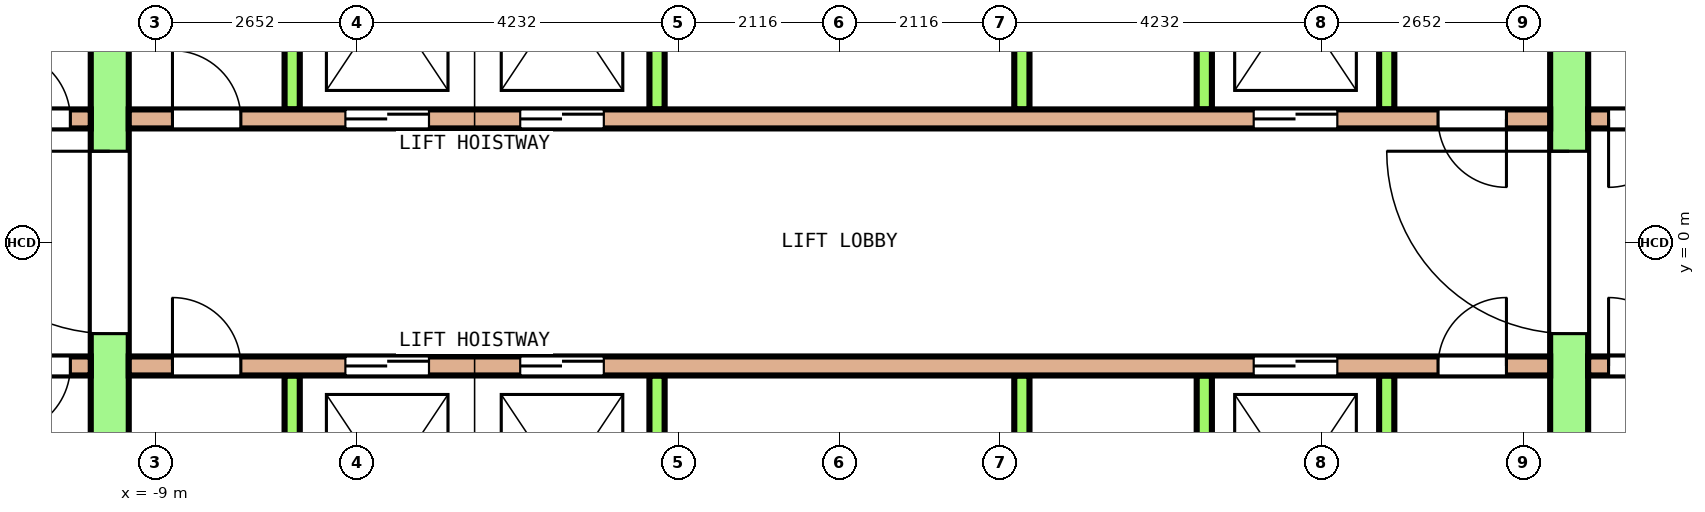
"""IFC4 building model, lengths in metres.
Left out: names, types, materials, properties, quantities, classifications, styles, units other than length and angle.
Written with IfcOpenShell. Run it as: python <this file> out.ifc"""

import sys

from ifc_helpers import new_model, si_unit, direction, frame, frame_2d, origin, place, context, subcontext, project, spatial, rectangle, extrude, element, fill, save


model = new_model("IFC4")
c1 = context("Model", 3, precision=1e-05, world=origin(), true_north=direction((0.0, 1.0)))
c2 = subcontext(c1, "Body", "Model", "MODEL_VIEW")
j1 = project(units=[si_unit("LENGTHUNIT", "METRE"), si_unit("PLANEANGLEUNIT", "RADIAN")], contexts=[c1])
p1 = place(None, origin())
s1 = spatial("IfcSite", under=j1, at=p1, CompositionType="ELEMENT")
p2 = place(p1, origin())
s2 = spatial("IfcBuilding", under=s1, at=p2, CompositionType="ELEMENT")
p3 = place(p2, frame((0.0, 0.0, 198.0)))
s3 = spatial("IfcBuildingStorey", under=s2, at=p3, CompositionType="ELEMENT", Elevation=198.0)
p4 = place(p3, frame((-9.6, -7.75, 0.0), z_axis=(0.0, 0.0, 1.0), x_axis=(0.0, 1.0, 0.0)))
e1 = element("IfcWall", 1, at=p4, inside=s3, PredefinedType="SHEAR", context=c2, shape_type="SweptSolid", body=[
    extrude(rectangle(XDim=15.5, YDim=0.5, at=frame_2d((7.75, 0.0))), origin(), (0.0, 0.0, 1.0), 4.1),
])
p5 = place(p4, frame((6.55, 0.0, 0.0)))
e2 = element("IfcOpeningElement", 2, at=p5, cuts=e1, PredefinedType="OPENING", context=c2, shape_type="SweptSolid", body=[
    extrude(rectangle(XDim=2.4, YDim=2.1, at=frame_2d((1.2, 1.05))), frame((0.0, 0.26, 0.0), z_axis=(0.0, -1.0, 0.0), x_axis=(1.0, 0.0, 0.0)), (0.0, 0.0, 1.0), 0.52),
])
p6 = place(p4, frame((13.45, 0.0, 0.0)))
e3 = element("IfcOpeningElement", 3, at=p6, cuts=e1, PredefinedType="OPENING", context=c2, shape_type="SweptSolid", body=[
    extrude(rectangle(XDim=1.2, YDim=2.1, at=frame_2d((0.6, 1.05))), frame((0.0, 0.26, 0.0), z_axis=(0.0, -1.0, 0.0), x_axis=(1.0, 0.0, 0.0)), (0.0, 0.0, 1.0), 0.52),
])
p7 = place(p4, frame((0.85, 0.0, 0.0)))
e4 = element("IfcOpeningElement", 4, at=p7, cuts=e1, PredefinedType="OPENING", context=c2, shape_type="SweptSolid", body=[
    extrude(rectangle(XDim=1.2, YDim=2.1, at=frame_2d((0.6, 1.05))), frame((0.0, 0.26, 0.0), z_axis=(0.0, -1.0, 0.0), x_axis=(1.0, 0.0, 0.0)), (0.0, 0.0, 1.0), 0.52),
])
p8 = place(p3, frame((9.6, -7.75, 0.0), z_axis=(0.0, 0.0, 1.0), x_axis=(0.0, 1.0, 0.0)))
e5 = element("IfcWall", 5, at=p8, inside=s3, PredefinedType="SHEAR", context=c2, shape_type="SweptSolid", body=[
    extrude(rectangle(XDim=15.5, YDim=0.5, at=frame_2d((7.75, 0.0))), origin(), (0.0, 0.0, 1.0), 4.1),
])
p9 = place(p8, frame((6.55, 0.0, 0.0)))
e6 = element("IfcOpeningElement", 6, at=p9, cuts=e5, PredefinedType="OPENING", context=c2, shape_type="SweptSolid", body=[
    extrude(rectangle(XDim=2.4, YDim=2.1, at=frame_2d((1.2, 1.05))), frame((0.0, 0.26, 0.0), z_axis=(0.0, -1.0, 0.0), x_axis=(1.0, 0.0, 0.0)), (0.0, 0.0, 1.0), 0.52),
])
p10 = place(p8, frame((13.45, 0.0, 0.0)))
e7 = element("IfcOpeningElement", 7, at=p10, cuts=e5, PredefinedType="OPENING", context=c2, shape_type="SweptSolid", body=[
    extrude(rectangle(XDim=1.2, YDim=2.1, at=frame_2d((0.6, 1.05))), frame((0.0, 0.26, 0.0), z_axis=(0.0, -1.0, 0.0), x_axis=(1.0, 0.0, 0.0)), (0.0, 0.0, 1.0), 0.52),
])
p11 = place(p8, frame((0.95, 0.0, 0.0)))
e8 = element("IfcOpeningElement", 8, at=p11, cuts=e5, PredefinedType="OPENING", context=c2, shape_type="SweptSolid", body=[
    extrude(rectangle(XDim=1.0, YDim=2.1, at=frame_2d((0.5, 1.05))), frame((0.0, 0.26, 0.0), z_axis=(0.0, -1.0, 0.0), x_axis=(1.0, 0.0, 0.0)), (0.0, 0.0, 1.0), 0.52),
])
p12 = place(p3, frame((-12.85, 1.625, 0.0), z_axis=(0.0, 0.0, 1.0), x_axis=(1.0, 0.0, 0.0)))
e9 = element("IfcWall", 9, at=p12, inside=s3, PredefinedType="SOLIDWALL", context=c2, shape_type="SweptSolid", body=[
    extrude(rectangle(XDim=3.0, YDim=0.25, at=frame_2d((1.5, 0.0))), origin(), (0.0, 0.0, 1.0), 4.1),
])
p13 = place(p12, frame((0.269, 0.0, 0.0)))
e10 = element("IfcOpeningElement", 10, at=p13, cuts=e9, PredefinedType="OPENING", context=c2, shape_type="SweptSolid", body=[
    extrude(rectangle(XDim=0.9, YDim=2.1, at=frame_2d((0.45, 1.05))), frame((0.0, 0.135, 0.0), z_axis=(0.0, -1.0, 0.0), x_axis=(1.0, 0.0, 0.0)), (0.0, 0.0, 1.0), 0.27),
])
p14 = place(p12, frame((1.831, 0.0, 0.0)))
e11 = element("IfcOpeningElement", 11, at=p14, cuts=e9, PredefinedType="OPENING", context=c2, shape_type="SweptSolid", body=[
    extrude(rectangle(XDim=0.9, YDim=2.1, at=frame_2d((0.45, 1.05))), frame((0.0, 0.135, 0.0), z_axis=(0.0, -1.0, 0.0), x_axis=(1.0, 0.0, 0.0)), (0.0, 0.0, 1.0), 0.27),
])
p15 = place(p3, frame((-9.35, 1.625, 0.0), z_axis=(0.0, 0.0, 1.0), x_axis=(1.0, 0.0, 0.0)))
e12 = element("IfcWall", 12, at=p15, inside=s3, PredefinedType="SOLIDWALL", context=c2, shape_type="SweptSolid", body=[
    extrude(rectangle(XDim=18.7, YDim=0.25, at=frame_2d((9.35, 0.0))), origin(), (0.0, 0.0, 1.0), 4.1),
])
p16 = place(p15, frame((2.85, 0.0, 0.0)))
e13 = element("IfcOpeningElement", 13, at=p16, cuts=e12, PredefinedType="OPENING", context=c2, shape_type="SweptSolid", body=[
    extrude(rectangle(XDim=1.1, YDim=2.1, at=frame_2d((0.55, 1.05))), frame((0.0, 0.135, 0.0), z_axis=(0.0, -1.0, 0.0), x_axis=(1.0, 0.0, 0.0)), (0.0, 0.0, 1.0), 0.27),
])
p17 = place(p15, frame((5.15, 0.0, 0.0)))
e14 = element("IfcOpeningElement", 14, at=p17, cuts=e12, PredefinedType="OPENING", context=c2, shape_type="SweptSolid", body=[
    extrude(rectangle(XDim=1.1, YDim=2.1, at=frame_2d((0.55, 1.05))), frame((0.0, 0.135, 0.0), z_axis=(0.0, -1.0, 0.0), x_axis=(1.0, 0.0, 0.0)), (0.0, 0.0, 1.0), 0.27),
])
p18 = place(p15, frame((14.8, 0.0, 0.0)))
e15 = element("IfcOpeningElement", 15, at=p18, cuts=e12, PredefinedType="OPENING", context=c2, shape_type="SweptSolid", body=[
    extrude(rectangle(XDim=1.1, YDim=2.1, at=frame_2d((0.55, 1.05))), frame((0.0, 0.135, 0.0), z_axis=(0.0, -1.0, 0.0), x_axis=(1.0, 0.0, 0.0)), (0.0, 0.0, 1.0), 0.27),
])
p19 = place(p15, frame((0.575, 0.0, 0.0)))
e16 = element("IfcOpeningElement", 16, at=p19, cuts=e12, PredefinedType="OPENING", context=c2, shape_type="SweptSolid", body=[
    extrude(rectangle(XDim=0.9, YDim=2.1, at=frame_2d((0.45, 1.05))), frame((0.0, 0.135, 0.0), z_axis=(0.0, -1.0, 0.0), x_axis=(1.0, 0.0, 0.0)), (0.0, 0.0, 1.0), 0.27),
])
p20 = place(p15, frame((17.225, 0.0, 0.0)))
e17 = element("IfcOpeningElement", 17, at=p20, cuts=e12, PredefinedType="OPENING", context=c2, shape_type="SweptSolid", body=[
    extrude(rectangle(XDim=0.9, YDim=2.1, at=frame_2d((0.45, 1.05))), frame((0.0, 0.135, 0.0), z_axis=(0.0, -1.0, 0.0), x_axis=(1.0, 0.0, 0.0)), (0.0, 0.0, 1.0), 0.27),
])
p21 = place(p3, frame((9.85, 1.625, 0.0), z_axis=(0.0, 0.0, 1.0), x_axis=(1.0, 0.0, 0.0)))
e18 = element("IfcWall", 18, at=p21, inside=s3, PredefinedType="SOLIDWALL", context=c2, shape_type="SweptSolid", body=[
    extrude(rectangle(XDim=3.0, YDim=0.25, at=frame_2d((1.5, 0.0))), origin(), (0.0, 0.0, 1.0), 4.1),
])
p22 = place(p21, frame((0.269, 0.0, 0.0)))
e19 = element("IfcOpeningElement", 19, at=p22, cuts=e18, PredefinedType="OPENING", context=c2, shape_type="SweptSolid", body=[
    extrude(rectangle(XDim=0.9, YDim=2.1, at=frame_2d((0.45, 1.05))), frame((0.0, 0.135, 0.0), z_axis=(0.0, -1.0, 0.0), x_axis=(1.0, 0.0, 0.0)), (0.0, 0.0, 1.0), 0.27),
])
p23 = place(p21, frame((1.831, 0.0, 0.0)))
e20 = element("IfcOpeningElement", 20, at=p23, cuts=e18, PredefinedType="OPENING", context=c2, shape_type="SweptSolid", body=[
    extrude(rectangle(XDim=0.9, YDim=2.1, at=frame_2d((0.45, 1.05))), frame((0.0, 0.135, 0.0), z_axis=(0.0, -1.0, 0.0), x_axis=(1.0, 0.0, 0.0)), (0.0, 0.0, 1.0), 0.27),
])
for number, where, z_axis, x_axis in (
    (21, (-7.2, 1.75, 0.0), (0.0, 0.0, 1.0), (0.0, 1.0, 0.0)),
    (22, (-2.4, 1.75, 0.0), (0.0, 0.0, 1.0), (0.0, 1.0, 0.0)),
    (23, (2.4, 1.75, 0.0), (0.0, 0.0, 1.0), (0.0, 1.0, 0.0)),
    (24, (4.8, 1.75, 0.0), (0.0, 0.0, 1.0), (0.0, 1.0, 0.0)),
    (25, (7.2, 1.75, 0.0), (0.0, 0.0, 1.0), (0.0, 1.0, 0.0)),
):
    element("IfcWall", number, at=place(p3, frame(where, z_axis=z_axis, x_axis=x_axis)), inside=s3, PredefinedType="SOLIDWALL", context=c2, shape_type="SweptSolid", body=[
        extrude(rectangle(XDim=2.9, YDim=0.2, at=frame_2d((1.45, 0.0))), origin(), (0.0, 0.0, 1.0), 4.1),
    ])
p24 = place(p3, frame((-12.85, -1.625, 0.0), z_axis=(0.0, 0.0, 1.0), x_axis=(1.0, 0.0, 0.0)))
e26 = element("IfcWall", 26, at=p24, inside=s3, PredefinedType="SOLIDWALL", context=c2, shape_type="SweptSolid", body=[
    extrude(rectangle(XDim=3.0, YDim=0.25, at=frame_2d((1.5, 0.0))), origin(), (0.0, 0.0, 1.0), 4.1),
])
p25 = place(p24, frame((0.269, 0.0, 0.0)))
e27 = element("IfcOpeningElement", 27, at=p25, cuts=e26, PredefinedType="OPENING", context=c2, shape_type="SweptSolid", body=[
    extrude(rectangle(XDim=0.9, YDim=2.1, at=frame_2d((0.45, 1.05))), frame((0.0, 0.135, 0.0), z_axis=(0.0, -1.0, 0.0), x_axis=(1.0, 0.0, 0.0)), (0.0, 0.0, 1.0), 0.27),
])
p26 = place(p24, frame((1.831, 0.0, 0.0)))
e28 = element("IfcOpeningElement", 28, at=p26, cuts=e26, PredefinedType="OPENING", context=c2, shape_type="SweptSolid", body=[
    extrude(rectangle(XDim=0.9, YDim=2.1, at=frame_2d((0.45, 1.05))), frame((0.0, 0.135, 0.0), z_axis=(0.0, -1.0, 0.0), x_axis=(1.0, 0.0, 0.0)), (0.0, 0.0, 1.0), 0.27),
])
p27 = place(p3, frame((-9.35, -1.625, 0.0), z_axis=(0.0, 0.0, 1.0), x_axis=(1.0, 0.0, 0.0)))
e29 = element("IfcWall", 29, at=p27, inside=s3, PredefinedType="SOLIDWALL", context=c2, shape_type="SweptSolid", body=[
    extrude(rectangle(XDim=18.7, YDim=0.25, at=frame_2d((9.35, 0.0))), origin(), (0.0, 0.0, 1.0), 4.1),
])
p28 = place(p27, frame((2.85, 0.0, 0.0)))
e30 = element("IfcOpeningElement", 30, at=p28, cuts=e29, PredefinedType="OPENING", context=c2, shape_type="SweptSolid", body=[
    extrude(rectangle(XDim=1.1, YDim=2.1, at=frame_2d((0.55, 1.05))), frame((0.0, 0.135, 0.0), z_axis=(0.0, -1.0, 0.0), x_axis=(1.0, 0.0, 0.0)), (0.0, 0.0, 1.0), 0.27),
])
p29 = place(p27, frame((5.15, 0.0, 0.0)))
e31 = element("IfcOpeningElement", 31, at=p29, cuts=e29, PredefinedType="OPENING", context=c2, shape_type="SweptSolid", body=[
    extrude(rectangle(XDim=1.1, YDim=2.1, at=frame_2d((0.55, 1.05))), frame((0.0, 0.135, 0.0), z_axis=(0.0, -1.0, 0.0), x_axis=(1.0, 0.0, 0.0)), (0.0, 0.0, 1.0), 0.27),
])
p30 = place(p27, frame((14.8, 0.0, 0.0)))
e32 = element("IfcOpeningElement", 32, at=p30, cuts=e29, PredefinedType="OPENING", context=c2, shape_type="SweptSolid", body=[
    extrude(rectangle(XDim=1.1, YDim=2.1, at=frame_2d((0.55, 1.05))), frame((0.0, 0.135, 0.0), z_axis=(0.0, -1.0, 0.0), x_axis=(1.0, 0.0, 0.0)), (0.0, 0.0, 1.0), 0.27),
])
p31 = place(p27, frame((0.575, 0.0, 0.0)))
e33 = element("IfcOpeningElement", 33, at=p31, cuts=e29, PredefinedType="OPENING", context=c2, shape_type="SweptSolid", body=[
    extrude(rectangle(XDim=0.9, YDim=2.1, at=frame_2d((0.45, 1.05))), frame((0.0, 0.135, 0.0), z_axis=(0.0, -1.0, 0.0), x_axis=(1.0, 0.0, 0.0)), (0.0, 0.0, 1.0), 0.27),
])
p32 = place(p27, frame((17.225, 0.0, 0.0)))
e34 = element("IfcOpeningElement", 34, at=p32, cuts=e29, PredefinedType="OPENING", context=c2, shape_type="SweptSolid", body=[
    extrude(rectangle(XDim=0.9, YDim=2.1, at=frame_2d((0.45, 1.05))), frame((0.0, 0.135, 0.0), z_axis=(0.0, -1.0, 0.0), x_axis=(1.0, 0.0, 0.0)), (0.0, 0.0, 1.0), 0.27),
])
p33 = place(p3, frame((9.85, -1.625, 0.0), z_axis=(0.0, 0.0, 1.0), x_axis=(1.0, 0.0, 0.0)))
e35 = element("IfcWall", 35, at=p33, inside=s3, PredefinedType="SOLIDWALL", context=c2, shape_type="SweptSolid", body=[
    extrude(rectangle(XDim=3.0, YDim=0.25, at=frame_2d((1.5, 0.0))), origin(), (0.0, 0.0, 1.0), 4.1),
])
p34 = place(p33, frame((0.269, 0.0, 0.0)))
e36 = element("IfcOpeningElement", 36, at=p34, cuts=e35, PredefinedType="OPENING", context=c2, shape_type="SweptSolid", body=[
    extrude(rectangle(XDim=0.9, YDim=2.1, at=frame_2d((0.45, 1.05))), frame((0.0, 0.135, 0.0), z_axis=(0.0, -1.0, 0.0), x_axis=(1.0, 0.0, 0.0)), (0.0, 0.0, 1.0), 0.27),
])
p35 = place(p33, frame((1.831, 0.0, 0.0)))
e37 = element("IfcOpeningElement", 37, at=p35, cuts=e35, PredefinedType="OPENING", context=c2, shape_type="SweptSolid", body=[
    extrude(rectangle(XDim=0.9, YDim=2.1, at=frame_2d((0.45, 1.05))), frame((0.0, 0.135, 0.0), z_axis=(0.0, -1.0, 0.0), x_axis=(1.0, 0.0, 0.0)), (0.0, 0.0, 1.0), 0.27),
])
for number, where, z_axis, x_axis in (
    (38, (-7.2, -4.65, 0.0), (0.0, 0.0, 1.0), (0.0, 1.0, 0.0)),
    (39, (-2.4, -4.65, 0.0), (0.0, 0.0, 1.0), (0.0, 1.0, 0.0)),
    (40, (2.4, -4.65, 0.0), (0.0, 0.0, 1.0), (0.0, 1.0, 0.0)),
    (41, (4.8, -4.65, 0.0), (0.0, 0.0, 1.0), (0.0, 1.0, 0.0)),
    (42, (7.2, -4.65, 0.0), (0.0, 0.0, 1.0), (0.0, 1.0, 0.0)),
):
    element("IfcWall", number, at=place(p3, frame(where, z_axis=z_axis, x_axis=x_axis)), inside=s3, PredefinedType="SOLIDWALL", context=c2, shape_type="SweptSolid", body=[
        extrude(rectangle(XDim=2.9, YDim=0.2, at=frame_2d((1.45, 0.0))), origin(), (0.0, 0.0, 1.0), 4.1),
    ])
p36 = place(p16, origin())
e43 = element("IfcDoor", 43, at=p36, inside=s3, OperationType="DOUBLE_DOOR_SLIDING", PredefinedType="DOOR", context=c2, shape_type="SweptSolid", body=[
    extrude(rectangle(XDim=1.1, YDim=2.1, at=frame_2d((0.55, 1.05))), frame((0.0, 0.075, 0.0), z_axis=(0.0, -1.0, 0.0), x_axis=(1.0, 0.0, 0.0)), (0.0, 0.0, 1.0), 0.15),
])
fill(e13, e43)
p37 = place(p17, origin())
e44 = element("IfcDoor", 44, at=p37, inside=s3, OperationType="DOUBLE_DOOR_SLIDING", PredefinedType="DOOR", context=c2, shape_type="SweptSolid", body=[
    extrude(rectangle(XDim=1.1, YDim=2.1, at=frame_2d((0.55, 1.05))), frame((0.0, 0.075, 0.0), z_axis=(0.0, -1.0, 0.0), x_axis=(1.0, 0.0, 0.0)), (0.0, 0.0, 1.0), 0.15),
])
fill(e14, e44)
p38 = place(p18, origin())
e45 = element("IfcDoor", 45, at=p38, inside=s3, OperationType="DOUBLE_DOOR_SLIDING", PredefinedType="DOOR", context=c2, shape_type="SweptSolid", body=[
    extrude(rectangle(XDim=1.1, YDim=2.1, at=frame_2d((0.55, 1.05))), frame((0.0, 0.075, 0.0), z_axis=(0.0, -1.0, 0.0), x_axis=(1.0, 0.0, 0.0)), (0.0, 0.0, 1.0), 0.15),
])
fill(e15, e45)
p39 = place(p28, origin())
e46 = element("IfcDoor", 46, at=p39, inside=s3, OperationType="DOUBLE_DOOR_SLIDING", PredefinedType="DOOR", context=c2, shape_type="SweptSolid", body=[
    extrude(rectangle(XDim=1.1, YDim=2.1, at=frame_2d((0.55, 1.05))), frame((0.0, 0.075, 0.0), z_axis=(0.0, -1.0, 0.0), x_axis=(1.0, 0.0, 0.0)), (0.0, 0.0, 1.0), 0.15),
])
fill(e30, e46)
p40 = place(p29, origin())
e47 = element("IfcDoor", 47, at=p40, inside=s3, OperationType="DOUBLE_DOOR_SLIDING", PredefinedType="DOOR", context=c2, shape_type="SweptSolid", body=[
    extrude(rectangle(XDim=1.1, YDim=2.1, at=frame_2d((0.55, 1.05))), frame((0.0, 0.075, 0.0), z_axis=(0.0, -1.0, 0.0), x_axis=(1.0, 0.0, 0.0)), (0.0, 0.0, 1.0), 0.15),
])
fill(e31, e47)
p41 = place(p30, origin())
e48 = element("IfcDoor", 48, at=p41, inside=s3, OperationType="DOUBLE_DOOR_SLIDING", PredefinedType="DOOR", context=c2, shape_type="SweptSolid", body=[
    extrude(rectangle(XDim=1.1, YDim=2.1, at=frame_2d((0.55, 1.05))), frame((0.0, 0.075, 0.0), z_axis=(0.0, -1.0, 0.0), x_axis=(1.0, 0.0, 0.0)), (0.0, 0.0, 1.0), 0.15),
])
fill(e32, e48)
p42 = place(p5, origin())
e49 = element("IfcDoor", 49, at=p42, inside=s3, OperationType="DOUBLE_DOOR_SINGLE_SWING", PredefinedType="DOOR", context=c2, shape_type="SweptSolid", body=[
    extrude(rectangle(XDim=2.4, YDim=2.1, at=frame_2d((1.2, 1.05))), frame((0.0, 0.2, 0.0), z_axis=(0.0, -1.0, 0.0), x_axis=(1.0, 0.0, 0.0)), (0.0, 0.0, 1.0), 0.4),
])
fill(e2, e49)
p43 = place(p9, origin())
e50 = element("IfcDoor", 50, at=p43, inside=s3, OperationType="DOUBLE_DOOR_SINGLE_SWING", PredefinedType="DOOR", context=c2, shape_type="SweptSolid", body=[
    extrude(rectangle(XDim=2.4, YDim=2.1, at=frame_2d((1.2, 1.05))), frame((0.0, 0.2, 0.0), z_axis=(0.0, -1.0, 0.0), x_axis=(1.0, 0.0, 0.0)), (0.0, 0.0, 1.0), 0.4),
])
fill(e6, e50)
p44 = place(p14, origin())
e51 = element("IfcDoor", 51, at=p44, inside=s3, OperationType="SINGLE_SWING_LEFT", PredefinedType="DOOR", context=c2, shape_type="SweptSolid", body=[
    extrude(rectangle(XDim=0.9, YDim=2.1, at=frame_2d((0.45, 1.05))), frame((0.0, 0.075, 0.0), z_axis=(0.0, -1.0, 0.0), x_axis=(1.0, 0.0, 0.0)), (0.0, 0.0, 1.0), 0.15),
])
fill(e11, e51)
p45 = place(p19, origin())
e52 = element("IfcDoor", 52, at=p45, inside=s3, OperationType="SINGLE_SWING_RIGHT", PredefinedType="DOOR", context=c2, shape_type="SweptSolid", body=[
    extrude(rectangle(XDim=0.9, YDim=2.1, at=frame_2d((0.45, 1.05))), frame((0.0, 0.075, 0.0), z_axis=(0.0, -1.0, 0.0), x_axis=(1.0, 0.0, 0.0)), (0.0, 0.0, 1.0), 0.15),
])
fill(e16, e52)
p46 = place(p20, origin())
e53 = element("IfcDoor", 53, at=p46, inside=s3, OperationType="SINGLE_SWING_LEFT", PredefinedType="DOOR", context=c2, shape_type="SweptSolid", body=[
    extrude(rectangle(XDim=0.9, YDim=2.1, at=frame_2d((0.45, 1.05))), frame((0.0, 0.075, 0.0), z_axis=(0.0, -1.0, 0.0), x_axis=(1.0, 0.0, 0.0)), (0.0, 0.0, 1.0), 0.15),
])
fill(e17, e53)
p47 = place(p22, origin())
e54 = element("IfcDoor", 54, at=p47, inside=s3, OperationType="SINGLE_SWING_RIGHT", PredefinedType="DOOR", context=c2, shape_type="SweptSolid", body=[
    extrude(rectangle(XDim=0.9, YDim=2.1, at=frame_2d((0.45, 1.05))), frame((0.0, 0.075, 0.0), z_axis=(0.0, -1.0, 0.0), x_axis=(1.0, 0.0, 0.0)), (0.0, 0.0, 1.0), 0.15),
])
fill(e19, e54)
p48 = place(p26, origin())
e55 = element("IfcDoor", 55, at=p48, inside=s3, OperationType="SINGLE_SWING_LEFT", PredefinedType="DOOR", context=c2, shape_type="SweptSolid", body=[
    extrude(rectangle(XDim=0.9, YDim=2.1, at=frame_2d((0.45, 1.05))), frame((0.0, 0.075, 0.0), z_axis=(0.0, -1.0, 0.0), x_axis=(1.0, 0.0, 0.0)), (0.0, 0.0, 1.0), 0.15),
])
fill(e28, e55)
p49 = place(p31, origin())
e56 = element("IfcDoor", 56, at=p49, inside=s3, OperationType="SINGLE_SWING_RIGHT", PredefinedType="DOOR", context=c2, shape_type="SweptSolid", body=[
    extrude(rectangle(XDim=0.9, YDim=2.1, at=frame_2d((0.45, 1.05))), frame((0.0, 0.075, 0.0), z_axis=(0.0, -1.0, 0.0), x_axis=(1.0, 0.0, 0.0)), (0.0, 0.0, 1.0), 0.15),
])
fill(e33, e56)
p50 = place(p32, origin())
e57 = element("IfcDoor", 57, at=p50, inside=s3, OperationType="SINGLE_SWING_LEFT", PredefinedType="DOOR", context=c2, shape_type="SweptSolid", body=[
    extrude(rectangle(XDim=0.9, YDim=2.1, at=frame_2d((0.45, 1.05))), frame((0.0, 0.075, 0.0), z_axis=(0.0, -1.0, 0.0), x_axis=(1.0, 0.0, 0.0)), (0.0, 0.0, 1.0), 0.15),
])
fill(e34, e57)
p51 = place(p34, origin())
e58 = element("IfcDoor", 58, at=p51, inside=s3, OperationType="SINGLE_SWING_RIGHT", PredefinedType="DOOR", context=c2, shape_type="SweptSolid", body=[
    extrude(rectangle(XDim=0.9, YDim=2.1, at=frame_2d((0.45, 1.05))), frame((0.0, 0.075, 0.0), z_axis=(0.0, -1.0, 0.0), x_axis=(1.0, 0.0, 0.0)), (0.0, 0.0, 1.0), 0.15),
])
fill(e36, e58)
save(model, sys.argv[1])
